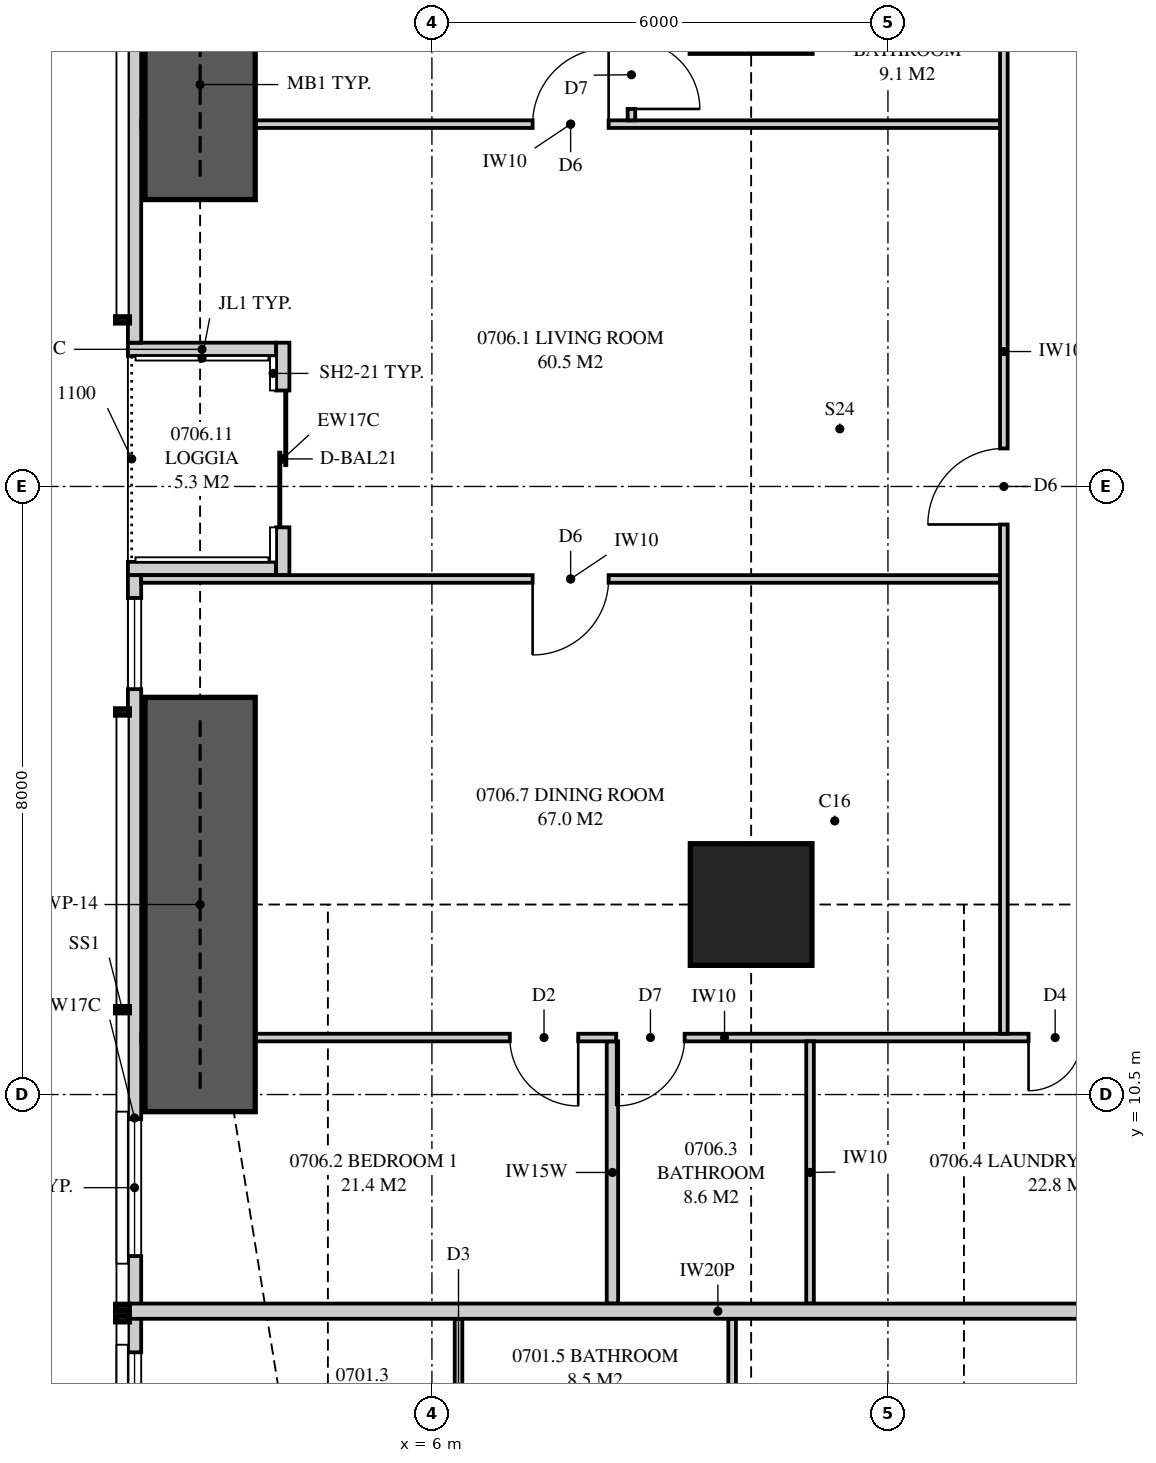
"""IFC4 building model, lengths in metres.
Left out: names, types, materials, properties, quantities, classifications, styles, units other than length and angle.
Written with IfcOpenShell. Run it as: python <this file> out.ifc"""

import sys

from ifc_helpers import new_model, si_unit, direction, frame, frame_2d, origin, origin_2d, place, context, subcontext, project, spatial, polyline, rectangle, outline, extrude, element, fill, save


model = new_model("IFC4")
c1 = context("Model", 3, precision=1e-05, world=origin(), true_north=direction((0.0, 1.0)))
c2 = subcontext(c1, "Body", "Model", "MODEL_VIEW")
j1 = project(units=[si_unit("LENGTHUNIT", "METRE"), si_unit("PLANEANGLEUNIT", "RADIAN")], contexts=[c1])
p1 = place(None, origin())
s1 = spatial("IfcSite", under=j1, at=p1, CompositionType="ELEMENT")
p2 = place(p1, origin())
s2 = spatial("IfcBuilding", under=s1, at=p2, CompositionType="ELEMENT")
p3 = place(p2, frame((0.0, 0.0, 31.05)))
s3 = spatial("IfcBuildingStorey", under=s2, at=p3, CompositionType="ELEMENT", Elevation=31.05)
for number, where, z_axis, x_axis in (
    (1, (10.2, 13.0, 0.0), (0.0, 0.0, 1.0), (1.0, 0.0, 0.0)),
    (2, (10.2, 25.0, 0.0), (0.0, 0.0, 1.0), (1.0, 0.0, 0.0)),
):
    element("IfcColumn", number, at=place(p3, frame(where, z_axis=z_axis, x_axis=x_axis)), inside=s3, PredefinedType="COLUMN", context=c2, shape_type="SweptSolid", body=[
        extrude(rectangle(XDim=1.6, YDim=1.6, at=origin_2d()), origin(), (0.0, 0.0, 1.0), 3.35),
    ])
p4 = place(p3, frame((2.087, 34.949, 0.0), z_axis=(0.0, 0.0, 1.0), x_axis=(0.0, -1.0, 0.0)))
e3 = element("IfcWall", 3, at=p4, inside=s3, PredefinedType="SOLIDWALL", context=c2, shape_type="SweptSolid", body=[
    extrude(outline(polyline([(0.0, 0.0), (14.557, 0.0), (14.557, 2.15), (9.949, 2.15), (9.949, 3.11), (9.823, 3.11), (9.823, 2.15), (9.73, 2.15), (9.73, 3.11), (0.0, 3.11), (0.0, 0.0)])), frame((0.0, 0.087, 0.0), z_axis=(0.0, -1.0, 0.0), x_axis=(1.0, 0.0, 0.0)), (0.0, 0.0, 1.0), 0.175),
])
p5 = place(p4, frame((2.757, 0.0, 0.4)))
e4 = element("IfcOpeningElement", 4, at=p5, cuts=e3, PredefinedType="OPENING", context=c2, shape_type="SweptSolid", body=[
    extrude(rectangle(XDim=1.8, YDim=1.7, at=frame_2d((0.9, 0.85))), frame((0.0, 0.097, 0.0), z_axis=(0.0, -1.0, 0.0), x_axis=(1.0, 0.0, 0.0)), (0.0, 0.0, 1.0), 0.195),
])
p6 = place(p4, frame((5.899, 0.0, 0.4)))
e5 = element("IfcOpeningElement", 5, at=p6, cuts=e3, PredefinedType="OPENING", context=c2, shape_type="SweptSolid", body=[
    extrude(rectangle(XDim=1.2, YDim=1.7, at=frame_2d((0.6, 0.85))), frame((0.0, 0.097, 0.0), z_axis=(0.0, -1.0, 0.0), x_axis=(1.0, 0.0, 0.0)), (0.0, 0.0, 1.0), 0.195),
])
p7 = place(p3, frame((2.087, 17.333, 0.0), z_axis=(0.0, 0.0, 1.0), x_axis=(0.0, -1.0, 0.0)))
e6 = element("IfcWall", 6, at=p7, inside=s3, PredefinedType="SOLIDWALL", context=c2, shape_type="SweptSolid", body=[
    extrude(outline(polyline([(0.0, 0.0), (14.282, 0.0), (14.282, 3.11), (4.552, 3.11), (4.552, 2.15), (4.459, 2.15), (4.459, 3.11), (4.333, 3.11), (4.333, 2.15), (0.0, 2.15), (0.0, 0.0)])), frame((0.0, 0.087, 0.0), z_axis=(0.0, -1.0, 0.0), x_axis=(1.0, 0.0, 0.0)), (0.0, 0.0, 1.0), 0.175),
])
p8 = place(p7, frame((0.3, 0.0, 0.4)))
e7 = element("IfcOpeningElement", 7, at=p8, cuts=e6, PredefinedType="OPENING", context=c2, shape_type="SweptSolid", body=[
    extrude(rectangle(XDim=1.2, YDim=1.7, at=frame_2d((0.6, 0.85))), frame((0.0, 0.097, 0.0), z_axis=(0.0, -1.0, 0.0), x_axis=(1.0, 0.0, 0.0)), (0.0, 0.0, 1.0), 0.195),
])
p9 = place(p7, frame((7.158, 0.0, 0.4)))
e8 = element("IfcOpeningElement", 8, at=p9, cuts=e6, PredefinedType="OPENING", context=c2, shape_type="SweptSolid", body=[
    extrude(rectangle(XDim=1.8, YDim=1.7, at=frame_2d((0.9, 0.85))), frame((0.0, 0.097, 0.0), z_axis=(0.0, -1.0, 0.0), x_axis=(1.0, 0.0, 0.0)), (0.0, 0.0, 1.0), 0.195),
])
p10 = place(p7, frame((10.225, 0.0, 0.4)))
e9 = element("IfcOpeningElement", 9, at=p10, cuts=e6, PredefinedType="OPENING", context=c2, shape_type="SweptSolid", body=[
    extrude(rectangle(XDim=1.8, YDim=1.7, at=frame_2d((0.9, 0.85))), frame((0.0, 0.097, 0.0), z_axis=(0.0, -1.0, 0.0), x_axis=(1.0, 0.0, 0.0)), (0.0, 0.0, 1.0), 0.195),
])
p11 = place(p3, frame((4.038, 20.392, 0.0), z_axis=(0.0, 0.0, 1.0), x_axis=(0.0, -1.0, 0.0)))
e10 = element("IfcWall", 10, at=p11, inside=s3, PredefinedType="SOLIDWALL", context=c2, shape_type="SweptSolid", body=[
    extrude(rectangle(XDim=3.058, YDim=0.175, at=frame_2d((1.529, 0.0))), origin(), (0.0, 0.0, 1.0), 3.11),
])
p12 = place(p11, frame((0.629, 0.0, 0.0)))
e11 = element("IfcOpeningElement", 11, at=p12, cuts=e10, PredefinedType="OPENING", context=c2, shape_type="SweptSolid", body=[
    extrude(rectangle(XDim=1.8, YDim=2.1, at=frame_2d((0.9, 1.05))), frame((0.0, 0.097, 0.0), z_axis=(0.0, -1.0, 0.0), x_axis=(1.0, 0.0, 0.0)), (0.0, 0.0, 1.0), 0.195),
])
for number, where, z_axis, x_axis in (
    (12, (2.0, 20.304, 0.0), (0.0, 0.0, 1.0), (1.0, 0.0, 0.0)),
    (13, (2.0, 17.421, 0.0), (0.0, 0.0, 1.0), (1.0, 0.0, 0.0)),
):
    element("IfcWall", number, at=place(p3, frame(where, z_axis=z_axis, x_axis=x_axis)), inside=s3, PredefinedType="SOLIDWALL", context=c2, shape_type="SweptSolid", body=[
        extrude(outline(polyline([(0.0, 0.0), (1.95, 0.0), (1.95, 3.11), (1.75, 3.11), (1.75, 2.15), (0.15, 2.15), (0.15, 3.11), (0.0, 3.11), (0.0, 0.0)])), frame((0.0, 0.087, 0.0), z_axis=(0.0, -1.0, 0.0), x_axis=(1.0, 0.0, 0.0)), (0.0, 0.0, 1.0), 0.175),
    ])
p13 = place(p3, frame((6.35, 0.175, 0.0), z_axis=(0.0, 0.0, 1.0), x_axis=(0.0, 1.0, 0.0)))
e14 = element("IfcWall", 14, at=p13, inside=s3, PredefinedType="PARTITIONING", context=c2, shape_type="SweptSolid", body=[
    extrude(outline(polyline([(0.0, 0.0), (7.375, 0.0), (7.375, 3.11), (2.988, 3.11), (2.988, 2.15), (1.234, 2.15), (1.234, 3.11), (0.0, 3.11), (0.0, 0.0)])), frame((0.0, 0.05, 0.0), z_axis=(0.0, -1.0, 0.0), x_axis=(1.0, 0.0, 0.0)), (0.0, 0.0, 1.0), 0.1),
])
p14 = place(p13, frame((3.492, 0.0, 0.0)))
e15 = element("IfcOpeningElement", 15, at=p14, cuts=e14, PredefinedType="OPENING", context=c2, shape_type="SweptSolid", body=[
    extrude(rectangle(XDim=0.9, YDim=2.1, at=frame_2d((0.45, 1.05))), frame((0.0, 0.06, 0.0), z_axis=(0.0, -1.0, 0.0), x_axis=(1.0, 0.0, 0.0)), (0.0, 0.0, 1.0), 0.12),
])
p15 = place(p13, frame((5.559, 0.0, 0.0)))
e16 = element("IfcOpeningElement", 16, at=p15, cuts=e14, PredefinedType="OPENING", context=c2, shape_type="SweptSolid", body=[
    extrude(rectangle(XDim=0.9, YDim=2.1, at=frame_2d((0.45, 1.05))), frame((0.0, 0.06, 0.0), z_axis=(0.0, -1.0, 0.0), x_axis=(1.0, 0.0, 0.0)), (0.0, 0.0, 1.0), 0.12),
])
p16 = place(p3, frame((9.95, 1.513, 0.0), z_axis=(0.0, 0.0, 1.0), x_axis=(0.0, 1.0, 0.0)))
e17 = element("IfcWall", 17, at=p16, inside=s3, PredefinedType="PARTITIONING", context=c2, shape_type="SweptSolid", body=[
    extrude(outline(polyline([(0.0, 0.0), (6.037, 0.0), (6.037, 2.51), (0.927, 2.51), (0.927, 2.15), (0.0, 2.15), (0.0, 0.0)])), frame((0.0, 0.05, 0.0), z_axis=(0.0, -1.0, 0.0), x_axis=(1.0, 0.0, 0.0)), (0.0, 0.0, 1.0), 0.1),
])
p17 = place(p16, frame((2.188, 0.0, 0.0)))
e18 = element("IfcOpeningElement", 18, at=p17, cuts=e17, PredefinedType="OPENING", context=c2, shape_type="SweptSolid", body=[
    extrude(rectangle(XDim=0.9, YDim=2.1, at=frame_2d((0.45, 1.05))), frame((0.0, 0.06, 0.0), z_axis=(0.0, -1.0, 0.0), x_axis=(1.0, 0.0, 0.0)), (0.0, 0.0, 1.0), 0.12),
])
p18 = place(p16, frame((3.612, 0.0, 0.0)))
e19 = element("IfcOpeningElement", 19, at=p18, cuts=e17, PredefinedType="OPENING", context=c2, shape_type="SweptSolid", body=[
    extrude(rectangle(XDim=0.9, YDim=2.1, at=frame_2d((0.45, 1.05))), frame((0.0, 0.06, 0.0), z_axis=(0.0, -1.0, 0.0), x_axis=(1.0, 0.0, 0.0)), (0.0, 0.0, 1.0), 0.12),
])
p19 = place(p3, frame((2.0, 7.65, 0.0), z_axis=(0.0, 0.0, 1.0), x_axis=(1.0, 0.0, 0.0)))
e20 = element("IfcWall", 20, at=p19, inside=s3, PredefinedType="PARTITIONING", context=c2, shape_type="SweptSolid", body=[
    extrude(outline(polyline([(0.0, 0.0), (15.525, 0.0), (15.525, 3.11), (11.337, 3.11), (11.337, 2.541), (10.663, 2.541), (10.663, 3.11), (9.51, 3.11), (9.51, 2.51), (6.89, 2.51), (6.89, 3.11), (2.969, 3.11), (2.969, 2.541), (2.74, 2.541), (2.74, 2.15), (0.896, 2.15), (0.896, 3.11), (0.0, 3.11), (0.0, 0.0)])), frame((0.0, 0.1, 0.0), z_axis=(0.0, -1.0, 0.0), x_axis=(1.0, 0.0, 0.0)), (0.0, 0.0, 1.0), 0.2),
])
p20 = place(p3, frame((2.175, 11.25, 0.0), z_axis=(0.0, 0.0, 1.0), x_axis=(1.0, 0.0, 0.0)))
e21 = element("IfcWall", 21, at=p20, inside=s3, PredefinedType="PARTITIONING", context=c2, shape_type="SweptSolid", body=[
    extrude(outline(polyline([(0.188, 3.11), (0.0, 3.11), (0.0, 0.0), (0.529, 0.0), (0.529, 0.263), (1.021, 0.263), (1.021, 0.0), (15.35, 0.0), (15.35, 3.11), (11.112, 3.11), (11.112, 2.541), (10.538, 2.541), (10.538, 3.11), (9.285, 3.11), (9.285, 2.51), (6.765, 2.51), (6.765, 3.11), (2.744, 3.11), (2.744, 2.541), (2.169, 2.541), (2.169, 3.11), (1.93, 3.11), (1.93, 2.15), (1.021, 2.15), (1.021, 1.887), (0.529, 1.887), (0.529, 2.15), (0.188, 2.15), (0.188, 3.11)])), frame((0.0, 0.05, 0.0), z_axis=(0.0, -1.0, 0.0), x_axis=(1.0, 0.0, 0.0)), (0.0, 0.0, 1.0), 0.1),
])
p21 = place(p20, frame((4.85, 0.0, 0.0)))
e22 = element("IfcOpeningElement", 22, at=p21, cuts=e21, PredefinedType="OPENING", context=c2, shape_type="SweptSolid", body=[
    extrude(rectangle(XDim=0.9, YDim=2.1, at=frame_2d((0.45, 1.05))), frame((0.0, 0.06, 0.0), z_axis=(0.0, -1.0, 0.0), x_axis=(1.0, 0.0, 0.0)), (0.0, 0.0, 1.0), 0.12),
])
p22 = place(p20, frame((6.25, 0.0, 0.0)))
e23 = element("IfcOpeningElement", 23, at=p22, cuts=e21, PredefinedType="OPENING", context=c2, shape_type="SweptSolid", body=[
    extrude(rectangle(XDim=0.9, YDim=2.1, at=frame_2d((0.45, 1.05))), frame((0.0, 0.06, 0.0), z_axis=(0.0, -1.0, 0.0), x_axis=(1.0, 0.0, 0.0)), (0.0, 0.0, 1.0), 0.12),
])
p23 = place(p20, frame((11.675, 0.0, 0.0)))
e24 = element("IfcOpeningElement", 24, at=p23, cuts=e21, PredefinedType="OPENING", context=c2, shape_type="SweptSolid", body=[
    extrude(rectangle(XDim=0.7, YDim=2.1, at=frame_2d((0.35, 1.05))), frame((0.0, 0.06, 0.0), z_axis=(0.0, -1.0, 0.0), x_axis=(1.0, 0.0, 0.0)), (0.0, 0.0, 1.0), 0.12),
])
p24 = place(p3, frame((8.375, 7.75, 0.0), z_axis=(0.0, 0.0, 1.0), x_axis=(0.0, 1.0, 0.0)))
e25 = element("IfcWall", 25, at=p24, inside=s3, PredefinedType="PLUMBINGWALL", context=c2, shape_type="SweptSolid", body=[
    extrude(rectangle(XDim=3.45, YDim=0.15, at=frame_2d((1.725, 0.0))), origin(), (0.0, 0.0, 1.0), 3.11),
])
p25 = place(p3, frame((10.975, 7.75, 0.0), z_axis=(0.0, 0.0, 1.0), x_axis=(0.0, 1.0, 0.0)))
e26 = element("IfcWall", 26, at=p25, inside=s3, PredefinedType="PARTITIONING", context=c2, shape_type="SweptSolid", body=[
    extrude(outline(polyline([(0.0, 0.0), (3.45, 0.0), (3.45, 3.11), (3.45, 2.51), (0.0, 2.51), (0.0, 3.11), (0.0, 0.0)])), frame((0.0, 0.05, 0.0), z_axis=(0.0, -1.0, 0.0), x_axis=(1.0, 0.0, 0.0)), (0.0, 0.0, 1.0), 0.1),
])
p26 = place(p3, frame((13.525, 11.3, 0.0), z_axis=(0.0, 0.0, 1.0), x_axis=(0.0, 1.0, 0.0)))
e27 = element("IfcWall", 27, at=p26, inside=s3, PredefinedType="PARTITIONING", context=c2, shape_type="SweptSolid", body=[
    extrude(outline(polyline([(0.0, 0.0), (17.95, 0.0), (17.95, 3.11), (13.987, 3.11), (13.987, 2.541), (13.413, 2.541), (13.413, 3.11), (1.987, 3.11), (1.987, 2.541), (1.413, 2.541), (1.413, 3.11), (0.0, 3.11), (0.0, 0.0)])), frame((0.0, 0.05, 0.0), z_axis=(0.0, -1.0, 0.0), x_axis=(1.0, 0.0, 0.0)), (0.0, 0.0, 1.0), 0.1),
])
p27 = place(p26, frame((6.7, 0.0, 0.0)))
e28 = element("IfcOpeningElement", 28, at=p27, cuts=e27, PredefinedType="OPENING", context=c2, shape_type="SweptSolid", body=[
    extrude(rectangle(XDim=1.0, YDim=2.1, at=frame_2d((0.5, 1.05))), frame((0.0, 0.06, 0.0), z_axis=(0.0, -1.0, 0.0), x_axis=(1.0, 0.0, 0.0)), (0.0, 0.0, 1.0), 0.12),
])
p28 = place(p3, frame((2.175, 17.283, 0.0), z_axis=(0.0, 0.0, 1.0), x_axis=(1.0, 0.0, 0.0)))
e29 = element("IfcWall", 29, at=p28, inside=s3, PredefinedType="PARTITIONING", context=c2, shape_type="SweptSolid", body=[
    extrude(outline(polyline([(0.0, 0.0), (11.3, 0.0), (11.3, 3.11), (9.285, 3.11), (9.285, 2.51), (6.765, 2.51), (6.765, 3.11), (1.635, 3.11), (1.635, 2.15), (0.0, 2.15), (0.0, 3.11), (0.0, 0.0)])), frame((0.0, 0.05, 0.0), z_axis=(0.0, -1.0, 0.0), x_axis=(1.0, 0.0, 0.0)), (0.0, 0.0, 1.0), 0.1),
])
p29 = place(p28, frame((5.15, 0.0, 0.0)))
e30 = element("IfcOpeningElement", 30, at=p29, cuts=e29, PredefinedType="OPENING", context=c2, shape_type="SweptSolid", body=[
    extrude(rectangle(XDim=1.0, YDim=2.1, at=frame_2d((0.5, 1.05))), frame((0.0, 0.06, 0.0), z_axis=(0.0, -1.0, 0.0), x_axis=(1.0, 0.0, 0.0)), (0.0, 0.0, 1.0), 0.12),
])
p30 = place(p3, frame((2.175, 23.267, 0.0), z_axis=(0.0, 0.0, 1.0), x_axis=(1.0, 0.0, 0.0)))
e31 = element("IfcWall", 31, at=p30, inside=s3, PredefinedType="PARTITIONING", context=c2, shape_type="SweptSolid", body=[
    extrude(outline(polyline([(0.529, 2.15), (0.0, 2.15), (0.0, 0.0), (0.529, 0.0), (0.529, 0.274), (1.021, 0.274), (1.021, 0.0), (11.3, 0.0), (11.3, 3.11), (9.285, 3.11), (9.285, 2.51), (6.765, 2.51), (6.765, 3.11), (1.635, 3.11), (1.635, 2.15), (1.021, 2.15), (1.021, 1.876), (0.529, 1.876), (0.529, 2.15)])), frame((0.0, 0.05, 0.0), z_axis=(0.0, -1.0, 0.0), x_axis=(1.0, 0.0, 0.0)), (0.0, 0.0, 1.0), 0.1),
])
p31 = place(p30, frame((5.15, 0.0, 0.0)))
e32 = element("IfcOpeningElement", 32, at=p31, cuts=e31, PredefinedType="OPENING", context=c2, shape_type="SweptSolid", body=[
    extrude(rectangle(XDim=1.0, YDim=2.1, at=frame_2d((0.5, 1.05))), frame((0.0, 0.06, 0.0), z_axis=(0.0, -1.0, 0.0), x_axis=(1.0, 0.0, 0.0)), (0.0, 0.0, 1.0), 0.12),
])
p32 = place(p3, frame((8.625, 23.317, 0.0), z_axis=(0.0, 0.0, 1.0), x_axis=(0.0, 1.0, 0.0)))
e33 = element("IfcWall", 33, at=p32, inside=s3, PredefinedType="PARTITIONING", context=c2, shape_type="SweptSolid", body=[
    extrude(outline(polyline([(0.0, 0.0), (5.933, 0.0), (5.933, 3.11), (1.971, 3.11), (1.971, 2.541), (1.396, 2.541), (1.396, 3.11), (0.0, 3.11), (0.0, 0.0)])), frame((0.0, 0.05, 0.0), z_axis=(0.0, -1.0, 0.0), x_axis=(1.0, 0.0, 0.0)), (0.0, 0.0, 1.0), 0.1),
])
p33 = place(p32, frame((0.15, 0.0, 0.0)))
e34 = element("IfcOpeningElement", 34, at=p33, cuts=e33, PredefinedType="OPENING", context=c2, shape_type="SweptSolid", body=[
    extrude(rectangle(XDim=0.9, YDim=2.1, at=frame_2d((0.45, 1.05))), frame((0.0, 0.06, 0.0), z_axis=(0.0, -1.0, 0.0), x_axis=(1.0, 0.0, 0.0)), (0.0, 0.0, 1.0), 0.12),
])
p34 = place(p32, frame((4.042, 0.0, 0.0)))
e35 = element("IfcOpeningElement", 35, at=p34, cuts=e33, PredefinedType="OPENING", context=c2, shape_type="SweptSolid", body=[
    extrude(rectangle(XDim=0.9, YDim=2.1, at=frame_2d((0.45, 1.05))), frame((0.0, 0.06, 0.0), z_axis=(0.0, -1.0, 0.0), x_axis=(1.0, 0.0, 0.0)), (0.0, 0.0, 1.0), 0.12),
])
for number, where, z_axis, x_axis in (
    (36, (2.95, 22.275, 0.0), (0.0, 0.0, 1.0), (0.0, 1.0, 0.0)),
    (37, (2.95, 10.275, 0.0), (0.0, 0.0, 1.0), (0.0, 1.0, 0.0)),
):
    element("IfcWall", number, at=place(p3, frame(where, z_axis=z_axis, x_axis=x_axis)), inside=s3, PredefinedType="SHEAR", context=c2, shape_type="SweptSolid", body=[
        extrude(rectangle(XDim=5.45, YDim=1.45, at=frame_2d((2.725, 0.0))), origin(), (0.0, 0.0, 1.0), 3.35),
    ])
p35 = place(p12, origin())
e38 = element("IfcDoor", 38, at=p35, inside=s3, OperationType="SLIDING_TO_LEFT", PredefinedType="DOOR", context=c2, shape_type="SweptSolid", body=[
    extrude(rectangle(XDim=1.8, YDim=2.1, at=frame_2d((0.9, 1.05))), frame((0.0, 0.025, 0.0), z_axis=(0.0, -1.0, 0.0), x_axis=(1.0, 0.0, 0.0)), (0.0, 0.0, 1.0), 0.05),
])
fill(e11, e38)
p36 = place(p8, origin())
e39 = element("IfcWindow", 39, at=p36, inside=s3, PartitioningType="SINGLE_PANEL", PredefinedType="WINDOW", context=c2, shape_type="SweptSolid", body=[
    extrude(rectangle(XDim=1.2, YDim=1.7, at=frame_2d((0.6, 0.85))), frame((0.0, 0.03, 0.0), z_axis=(0.0, -1.0, 0.0), x_axis=(1.0, 0.0, 0.0)), (0.0, 0.0, 1.0), 0.06),
])
fill(e7, e39)
p37 = place(p9, origin())
e40 = element("IfcWindow", 40, at=p37, inside=s3, PartitioningType="SINGLE_PANEL", PredefinedType="WINDOW", context=c2, shape_type="SweptSolid", body=[
    extrude(rectangle(XDim=1.8, YDim=1.7, at=frame_2d((0.9, 0.85))), frame((0.0, 0.03, 0.0), z_axis=(0.0, -1.0, 0.0), x_axis=(1.0, 0.0, 0.0)), (0.0, 0.0, 1.0), 0.06),
])
fill(e8, e40)
p38 = place(p10, origin())
e41 = element("IfcWindow", 41, at=p38, inside=s3, PartitioningType="SINGLE_PANEL", PredefinedType="WINDOW", context=c2, shape_type="SweptSolid", body=[
    extrude(rectangle(XDim=1.8, YDim=1.7, at=frame_2d((0.9, 0.85))), frame((0.0, 0.03, 0.0), z_axis=(0.0, -1.0, 0.0), x_axis=(1.0, 0.0, 0.0)), (0.0, 0.0, 1.0), 0.06),
])
fill(e9, e41)
p39 = place(p21, frame((0.9, 0.0, 0.0), z_axis=(0.0, 0.0, 1.0), x_axis=(-1.0, 0.0, 0.0)))
e42 = element("IfcDoor", 42, at=p39, inside=s3, OperationType="SINGLE_SWING_LEFT", PredefinedType="DOOR", context=c2, shape_type="SweptSolid", body=[
    extrude(rectangle(XDim=0.9, YDim=2.1, at=frame_2d((0.45, 1.05))), frame((0.0, 0.025, 0.0), z_axis=(0.0, -1.0, 0.0), x_axis=(1.0, 0.0, 0.0)), (0.0, 0.0, 1.0), 0.05),
])
fill(e22, e42)
p40 = place(p22, frame((0.9, 0.0, 0.0), z_axis=(0.0, 0.0, 1.0), x_axis=(-1.0, 0.0, 0.0)))
e43 = element("IfcDoor", 43, at=p40, inside=s3, OperationType="SINGLE_SWING_RIGHT", PredefinedType="DOOR", context=c2, shape_type="SweptSolid", body=[
    extrude(rectangle(XDim=0.9, YDim=2.1, at=frame_2d((0.45, 1.05))), frame((0.0, 0.025, 0.0), z_axis=(0.0, -1.0, 0.0), x_axis=(1.0, 0.0, 0.0)), (0.0, 0.0, 1.0), 0.05),
])
fill(e23, e43)
p41 = place(p23, frame((0.7, 0.0, 0.0), z_axis=(0.0, 0.0, 1.0), x_axis=(-1.0, 0.0, 0.0)))
e44 = element("IfcDoor", 44, at=p41, inside=s3, OperationType="SINGLE_SWING_RIGHT", PredefinedType="DOOR", context=c2, shape_type="SweptSolid", body=[
    extrude(rectangle(XDim=0.7, YDim=2.1, at=frame_2d((0.35, 1.05))), frame((0.0, 0.025, 0.0), z_axis=(0.0, -1.0, 0.0), x_axis=(1.0, 0.0, 0.0)), (0.0, 0.0, 1.0), 0.05),
])
fill(e24, e44)
p42 = place(p27, origin())
e45 = element("IfcDoor", 45, at=p42, inside=s3, OperationType="SINGLE_SWING_LEFT", PredefinedType="DOOR", context=c2, shape_type="SweptSolid", body=[
    extrude(rectangle(XDim=1.0, YDim=2.1, at=frame_2d((0.5, 1.05))), frame((0.0, 0.025, 0.0), z_axis=(0.0, -1.0, 0.0), x_axis=(1.0, 0.0, 0.0)), (0.0, 0.0, 1.0), 0.05),
])
fill(e28, e45)
p43 = place(p29, frame((1.0, 0.0, 0.0), z_axis=(0.0, 0.0, 1.0), x_axis=(-1.0, 0.0, 0.0)))
e46 = element("IfcDoor", 46, at=p43, inside=s3, OperationType="SINGLE_SWING_RIGHT", PredefinedType="DOOR", context=c2, shape_type="SweptSolid", body=[
    extrude(rectangle(XDim=1.0, YDim=2.1, at=frame_2d((0.5, 1.05))), frame((0.0, 0.025, 0.0), z_axis=(0.0, -1.0, 0.0), x_axis=(1.0, 0.0, 0.0)), (0.0, 0.0, 1.0), 0.05),
])
fill(e30, e46)
p44 = place(p31, origin())
e47 = element("IfcDoor", 47, at=p44, inside=s3, OperationType="SINGLE_SWING_RIGHT", PredefinedType="DOOR", context=c2, shape_type="SweptSolid", body=[
    extrude(rectangle(XDim=1.0, YDim=2.1, at=frame_2d((0.5, 1.05))), frame((0.0, 0.025, 0.0), z_axis=(0.0, -1.0, 0.0), x_axis=(1.0, 0.0, 0.0)), (0.0, 0.0, 1.0), 0.05),
])
fill(e32, e47)
p45 = place(p33, frame((0.9, 0.0, 0.0), z_axis=(0.0, 0.0, 1.0), x_axis=(-1.0, 0.0, 0.0)))
e48 = element("IfcDoor", 48, at=p45, inside=s3, OperationType="SINGLE_SWING_RIGHT", PredefinedType="DOOR", context=c2, shape_type="SweptSolid", body=[
    extrude(rectangle(XDim=0.9, YDim=2.1, at=frame_2d((0.45, 1.05))), frame((0.0, 0.025, 0.0), z_axis=(0.0, -1.0, 0.0), x_axis=(1.0, 0.0, 0.0)), (0.0, 0.0, 1.0), 0.05),
])
fill(e34, e48)
save(model, sys.argv[1])
